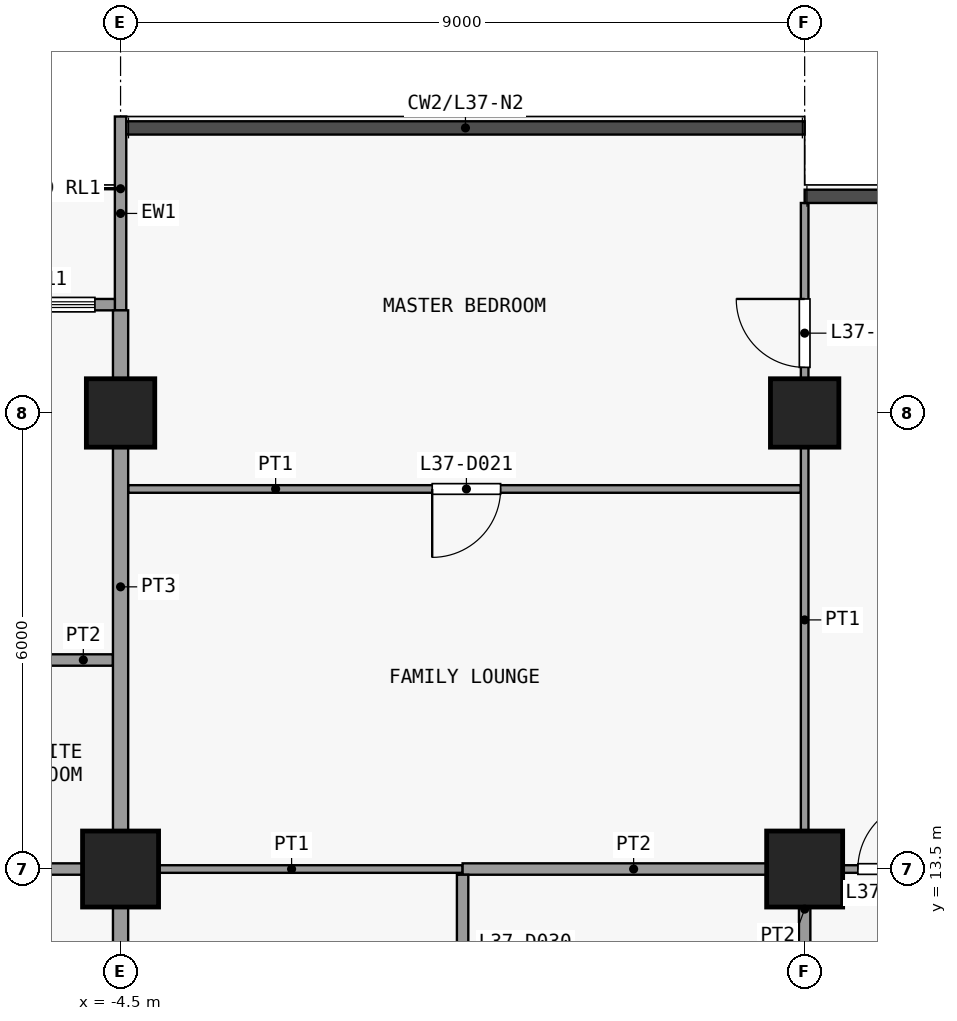
"""IFC4 building model, lengths in metres.
Left out: names, types, materials, properties, quantities, classifications, styles, units other than length and angle.
Written with IfcOpenShell. Run it as: python <this file> out.ifc"""

import sys

from ifc_helpers import new_model, si_unit, direction, frame, frame_2d, origin, origin_2d, place, context, subcontext, project, spatial, rectangle, extrude, element, fill, save


model = new_model("IFC4")
c1 = context("Model", 3, precision=1e-05, world=origin(), true_north=direction((0.0, 1.0)))
c2 = subcontext(c1, "Body", "Model", "MODEL_VIEW")
j1 = project(units=[si_unit("LENGTHUNIT", "METRE"), si_unit("PLANEANGLEUNIT", "RADIAN")], contexts=[c1])
p1 = place(None, origin())
s1 = spatial("IfcSite", under=j1, at=p1, CompositionType="ELEMENT")
p2 = place(p1, origin())
s2 = spatial("IfcBuilding", under=s1, at=p2, CompositionType="ELEMENT")
p3 = place(p2, frame((0.0, 0.0, 152.9)))
s3 = spatial("IfcBuildingStorey", under=s2, at=p3, CompositionType="ELEMENT", Elevation=152.9)
p4 = place(p3, frame((-4.5, 13.5, 0.0), z_axis=(0.0, 0.0, 1.0), x_axis=(1.0, 0.0, 0.0)))
e1 = element("IfcColumn", 1, at=p4, inside=s3, PredefinedType="COLUMN", context=c2, shape_type="SweptSolid", body=[
    extrude(rectangle(XDim=1.0, YDim=1.0, at=origin_2d()), origin(), (0.0, 0.0, 1.0), 3.6),
])
p5 = place(p3, frame((-4.5, 19.5, 0.0), z_axis=(0.0, 0.0, 1.0), x_axis=(1.0, 0.0, 0.0)))
e2 = element("IfcColumn", 2, at=p5, inside=s3, PredefinedType="COLUMN", context=c2, shape_type="SweptSolid", body=[
    extrude(rectangle(XDim=0.9, YDim=0.9, at=origin_2d()), origin(), (0.0, 0.0, 1.0), 3.6),
])
p6 = place(p3, frame((4.5, 13.5, 0.0), z_axis=(0.0, 0.0, 1.0), x_axis=(1.0, 0.0, 0.0)))
e3 = element("IfcColumn", 3, at=p6, inside=s3, PredefinedType="COLUMN", context=c2, shape_type="SweptSolid", body=[
    extrude(rectangle(XDim=1.0, YDim=1.0, at=origin_2d()), origin(), (0.0, 0.0, 1.0), 3.6),
])
p7 = place(p3, frame((4.5, 19.5, 0.0), z_axis=(0.0, 0.0, 1.0), x_axis=(1.0, 0.0, 0.0)))
e4 = element("IfcColumn", 4, at=p7, inside=s3, PredefinedType="COLUMN", context=c2, shape_type="SweptSolid", body=[
    extrude(rectangle(XDim=0.9, YDim=0.9, at=origin_2d()), origin(), (0.0, 0.0, 1.0), 3.6),
])
p8 = place(p3, frame((-4.5, 20.85, 0.0), z_axis=(0.0, 0.0, 1.0), x_axis=(0.0, 1.0, 0.0)))
e5 = element("IfcWall", 5, at=p8, inside=s3, PredefinedType="SOLIDWALL", context=c2, shape_type="SweptSolid", body=[
    extrude(rectangle(XDim=2.55, YDim=0.15, at=frame_2d((1.275, 0.0))), origin(), (0.0, 0.0, 1.0), 3.3),
])
p9 = place(p3, frame((-10.425, 20.925, 0.0), z_axis=(0.0, 0.0, 1.0), x_axis=(1.0, 0.0, 0.0)))
e6 = element("IfcWall", 6, at=p9, inside=s3, PredefinedType="SOLIDWALL", context=c2, shape_type="SweptSolid", body=[
    extrude(rectangle(XDim=5.85, YDim=0.15, at=frame_2d((2.925, 0.0))), origin(), (0.0, 0.0, 1.0), 3.3),
])
p10 = place(p9, frame((2.325, 0.0, 0.0)))
e7 = element("IfcOpeningElement", 7, at=p10, cuts=e6, PredefinedType="OPENING", context=c2, shape_type="SweptSolid", body=[
    extrude(rectangle(XDim=1.2, YDim=2.4, at=frame_2d((0.6, 1.2))), frame((0.0, 0.085, 0.0), z_axis=(0.0, -1.0, 0.0), x_axis=(1.0, 0.0, 0.0)), (0.0, 0.0, 1.0), 0.17),
])
p11 = place(p9, frame((0.262, 0.0, 0.9)))
e8 = element("IfcOpeningElement", 8, at=p11, cuts=e6, PredefinedType="OPENING", context=c2, shape_type="SweptSolid", body=[
    extrude(rectangle(XDim=1.8, YDim=2.1, at=frame_2d((0.9, 1.05))), frame((0.0, 0.085, 0.0), z_axis=(0.0, -1.0, 0.0), x_axis=(1.0, 0.0, 0.0)), (0.0, 0.0, 1.0), 0.17),
])
p12 = place(p9, frame((3.788, 0.0, 0.9)))
e9 = element("IfcOpeningElement", 9, at=p12, cuts=e6, PredefinedType="OPENING", context=c2, shape_type="SweptSolid", body=[
    extrude(rectangle(XDim=1.8, YDim=2.1, at=frame_2d((0.9, 1.05))), frame((0.0, 0.085, 0.0), z_axis=(0.0, -1.0, 0.0), x_axis=(1.0, 0.0, 0.0)), (0.0, 0.0, 1.0), 0.17),
])
p13 = place(p3, frame((-4.5, 13.5, 0.0), z_axis=(0.0, 0.0, 1.0), x_axis=(1.0, 0.0, 0.0)))
e10 = element("IfcWall", 10, at=p13, inside=s3, PredefinedType="PARTITIONING", context=c2, shape_type="SweptSolid", body=[
    extrude(rectangle(XDim=4.5, YDim=0.1, at=frame_2d((2.25, 0.0))), origin(), (0.0, 0.0, 1.0), 3.3),
])
p14 = place(p3, frame((4.5, 13.5, 0.0), z_axis=(0.0, 0.0, 1.0), x_axis=(1.0, 0.0, 0.0)))
e11 = element("IfcWall", 11, at=p14, inside=s3, PredefinedType="PARTITIONING", context=c2, shape_type="SweptSolid", body=[
    extrude(rectangle(XDim=2.4, YDim=0.1, at=frame_2d((1.2, 0.0))), origin(), (0.0, 0.0, 1.0), 3.3),
])
p15 = place(p14, frame((0.7, 0.0, 0.0)))
e12 = element("IfcOpeningElement", 12, at=p15, cuts=e11, PredefinedType="OPENING", context=c2, shape_type="SweptSolid", body=[
    extrude(rectangle(XDim=0.9, YDim=2.1, at=frame_2d((0.45, 1.05))), frame((0.0, 0.06, 0.0), z_axis=(0.0, -1.0, 0.0), x_axis=(1.0, 0.0, 0.0)), (0.0, 0.0, 1.0), 0.12),
])
p16 = place(p3, frame((-10.5, 13.5, 0.0), z_axis=(0.0, 0.0, 1.0), x_axis=(1.0, 0.0, 0.0)))
e13 = element("IfcWall", 13, at=p16, inside=s3, PredefinedType="PARTITIONING", context=c2, shape_type="SweptSolid", body=[
    extrude(rectangle(XDim=6.0, YDim=0.15, at=frame_2d((3.0, 0.0))), origin(), (0.0, 0.0, 1.0), 3.3),
])
p17 = place(p3, frame((0.0, 13.5, 0.0), z_axis=(0.0, 0.0, 1.0), x_axis=(1.0, 0.0, 0.0)))
e14 = element("IfcWall", 14, at=p17, inside=s3, PredefinedType="PARTITIONING", context=c2, shape_type="SweptSolid", body=[
    extrude(rectangle(XDim=4.5, YDim=0.15, at=frame_2d((2.25, 0.0))), origin(), (0.0, 0.0, 1.0), 3.3),
])
p18 = place(p3, frame((-7.2, 16.25, 0.0), z_axis=(0.0, 0.0, 1.0), x_axis=(1.0, 0.0, 0.0)))
e15 = element("IfcWall", 15, at=p18, inside=s3, PredefinedType="PARTITIONING", context=c2, shape_type="SweptSolid", body=[
    extrude(rectangle(XDim=2.6, YDim=0.15, at=frame_2d((1.3, 0.0))), origin(), (0.0, 0.0, 1.0), 3.3),
])
p19 = place(p18, frame((0.8, 0.0, 0.0)))
e16 = element("IfcOpeningElement", 16, at=p19, cuts=e15, PredefinedType="OPENING", context=c2, shape_type="SweptSolid", body=[
    extrude(rectangle(XDim=0.9, YDim=2.1, at=frame_2d((0.45, 1.05))), frame((0.0, 0.085, 0.0), z_axis=(0.0, -1.0, 0.0), x_axis=(1.0, 0.0, 0.0)), (0.0, 0.0, 1.0), 0.17),
])
p20 = place(p3, frame((-4.4, 18.5, 0.0), z_axis=(0.0, 0.0, 1.0), x_axis=(1.0, 0.0, 0.0)))
e17 = element("IfcWall", 17, at=p20, inside=s3, PredefinedType="PARTITIONING", context=c2, shape_type="SweptSolid", body=[
    extrude(rectangle(XDim=8.85, YDim=0.1, at=frame_2d((4.425, 0.0))), origin(), (0.0, 0.0, 1.0), 3.3),
])
p21 = place(p20, frame((4.0, 0.0, 0.0)))
e18 = element("IfcOpeningElement", 18, at=p21, cuts=e17, PredefinedType="OPENING", context=c2, shape_type="SweptSolid", body=[
    extrude(rectangle(XDim=0.9, YDim=2.1, at=frame_2d((0.45, 1.05))), frame((0.0, 0.06, 0.0), z_axis=(0.0, -1.0, 0.0), x_axis=(1.0, 0.0, 0.0)), (0.0, 0.0, 1.0), 0.12),
])
p22 = place(p3, frame((-4.5, 10.6, 0.0), z_axis=(0.0, 0.0, 1.0), x_axis=(0.0, 1.0, 0.0)))
e19 = element("IfcWall", 19, at=p22, inside=s3, PredefinedType="PARTITIONING", context=c2, shape_type="SweptSolid", body=[
    extrude(rectangle(XDim=2.825, YDim=0.2, at=frame_2d((1.413, 0.0))), origin(), (0.0, 0.0, 1.0), 3.3),
])
p23 = place(p3, frame((-4.5, 13.575, 0.0), z_axis=(0.0, 0.0, 1.0), x_axis=(0.0, 1.0, 0.0)))
e20 = element("IfcWall", 20, at=p23, inside=s3, PredefinedType="PARTITIONING", context=c2, shape_type="SweptSolid", body=[
    extrude(rectangle(XDim=7.275, YDim=0.2, at=frame_2d((3.638, 0.0))), origin(), (0.0, 0.0, 1.0), 3.3),
])
p24 = place(p3, frame((0.0, 10.6, 0.0), z_axis=(0.0, 0.0, 1.0), x_axis=(0.0, 1.0, 0.0)))
e21 = element("IfcWall", 21, at=p24, inside=s3, PredefinedType="PARTITIONING", context=c2, shape_type="SweptSolid", body=[
    extrude(rectangle(XDim=2.825, YDim=0.15, at=frame_2d((1.413, 0.0))), origin(), (0.0, 0.0, 1.0), 3.3),
])
p25 = place(p24, frame((1.0, 0.0, 0.0)))
e22 = element("IfcOpeningElement", 22, at=p25, cuts=e21, PredefinedType="OPENING", context=c2, shape_type="SweptSolid", body=[
    extrude(rectangle(XDim=0.9, YDim=2.1, at=frame_2d((0.45, 1.05))), frame((0.0, 0.085, 0.0), z_axis=(0.0, -1.0, 0.0), x_axis=(1.0, 0.0, 0.0)), (0.0, 0.0, 1.0), 0.17),
])
p26 = place(p3, frame((4.5, 13.575, 0.0), z_axis=(0.0, 0.0, 1.0), x_axis=(0.0, 1.0, 0.0)))
e23 = element("IfcWall", 23, at=p26, inside=s3, PredefinedType="PARTITIONING", context=c2, shape_type="SweptSolid", body=[
    extrude(rectangle(XDim=8.688, YDim=0.1, at=frame_2d((4.344, 0.0))), origin(), (0.0, 0.0, 1.0), 3.3),
])
p27 = place(p26, frame((6.525, 0.0, 0.0)))
e24 = element("IfcOpeningElement", 24, at=p27, cuts=e23, PredefinedType="OPENING", context=c2, shape_type="SweptSolid", body=[
    extrude(rectangle(XDim=0.9, YDim=2.1, at=frame_2d((0.45, 1.05))), frame((0.0, 0.06, 0.0), z_axis=(0.0, -1.0, 0.0), x_axis=(1.0, 0.0, 0.0)), (0.0, 0.0, 1.0), 0.12),
])
p28 = place(p3, frame((4.5, 10.6, 0.0), z_axis=(0.0, 0.0, 1.0), x_axis=(0.0, 1.0, 0.0)))
e25 = element("IfcWall", 25, at=p28, inside=s3, PredefinedType="PARTITIONING", context=c2, shape_type="SweptSolid", body=[
    extrude(rectangle(XDim=2.825, YDim=0.15, at=frame_2d((1.413, 0.0))), origin(), (0.0, 0.0, 1.0), 3.3),
])
p29 = place(p28, frame((0.9, 0.0, 0.0)))
e26 = element("IfcOpeningElement", 26, at=p29, cuts=e25, PredefinedType="OPENING", context=c2, shape_type="SweptSolid", body=[
    extrude(rectangle(XDim=0.9, YDim=2.1, at=frame_2d((0.45, 1.05))), frame((0.0, 0.085, 0.0), z_axis=(0.0, -1.0, 0.0), x_axis=(1.0, 0.0, 0.0)), (0.0, 0.0, 1.0), 0.17),
])
p30 = place(p12, origin())
e27 = element("IfcWindow", 27, at=p30, inside=s3, PartitioningType="SINGLE_PANEL", PredefinedType="WINDOW", context=c2, shape_type="SweptSolid", body=[
    extrude(rectangle(XDim=1.8, YDim=2.1, at=frame_2d((0.9, 1.05))), frame((0.0, 0.03, 0.0), z_axis=(0.0, -1.0, 0.0), x_axis=(1.0, 0.0, 0.0)), (0.0, 0.0, 1.0), 0.06),
])
fill(e9, e27)
p31 = place(p15, origin())
e28 = element("IfcDoor", 28, at=p31, inside=s3, OperationType="SINGLE_SWING_LEFT", PredefinedType="DOOR", context=c2, shape_type="SweptSolid", body=[
    extrude(rectangle(XDim=0.9, YDim=2.1, at=frame_2d((0.45, 1.05))), frame((0.0, 0.025, 0.0), z_axis=(0.0, -1.0, 0.0), x_axis=(1.0, 0.0, 0.0)), (0.0, 0.0, 1.0), 0.05),
])
fill(e12, e28)
p32 = place(p21, origin())
e29 = element("IfcDoor", 29, at=p32, inside=s3, OperationType="SINGLE_SWING_LEFT", PredefinedType="DOOR", context=c2, shape_type="SweptSolid", body=[
    extrude(rectangle(XDim=0.9, YDim=2.1, at=frame_2d((0.45, 1.05))), frame((0.0, 0.025, 0.0), z_axis=(0.0, -1.0, 0.0), x_axis=(1.0, 0.0, 0.0)), (0.0, 0.0, 1.0), 0.05),
])
fill(e18, e29)
p33 = place(p27, origin())
e30 = element("IfcDoor", 30, at=p33, inside=s3, OperationType="SINGLE_SWING_LEFT", PredefinedType="DOOR", context=c2, shape_type="SweptSolid", body=[
    extrude(rectangle(XDim=0.9, YDim=2.1, at=frame_2d((0.45, 1.05))), frame((0.0, 0.025, 0.0), z_axis=(0.0, -1.0, 0.0), x_axis=(1.0, 0.0, 0.0)), (0.0, 0.0, 1.0), 0.05),
])
fill(e24, e30)
save(model, sys.argv[1])
